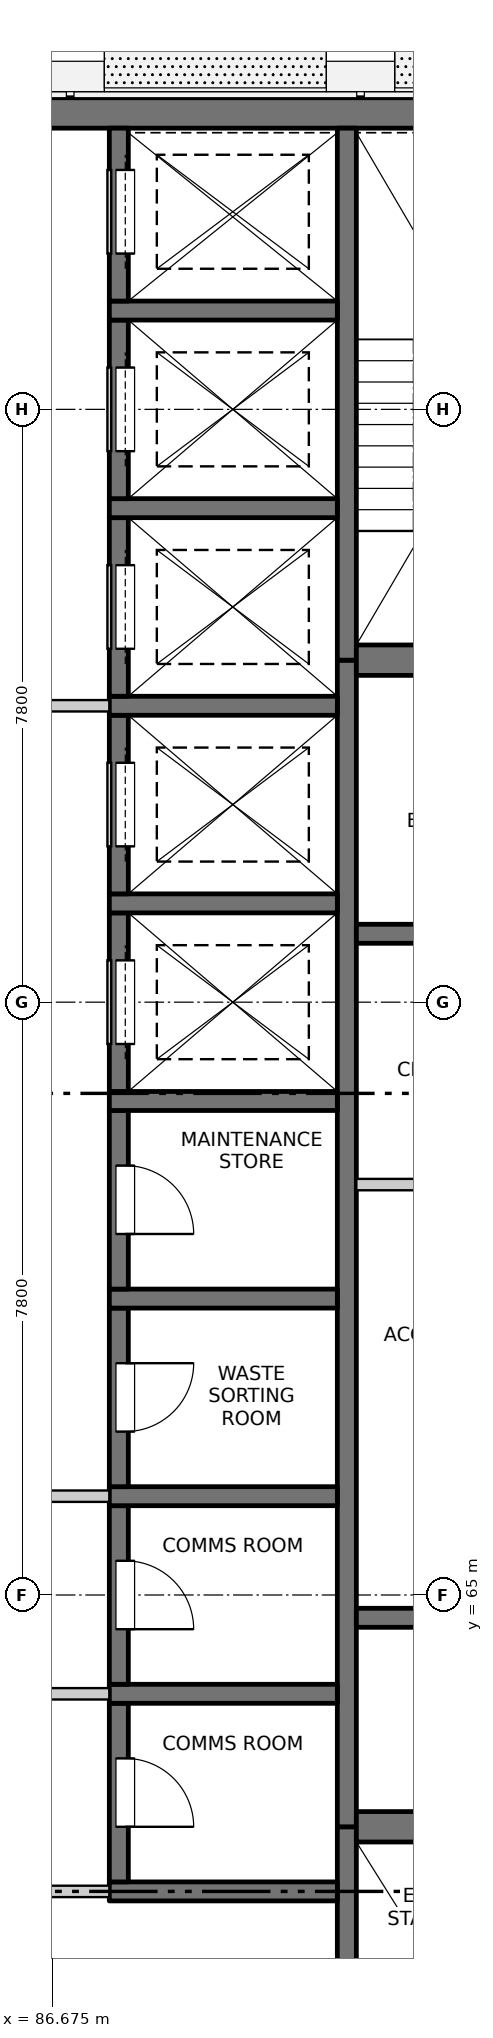
"""IFC4 building model, lengths in metres.
Left out: names, types, materials, properties, quantities, classifications, styles, units other than length and angle.
Written with IfcOpenShell. Run it as: python <this file> out.ifc"""

import sys

from ifc_helpers import new_model, si_unit, direction, frame, frame_2d, origin, place, context, subcontext, project, spatial, rectangle, extrude, element, fill, save


model = new_model("IFC4")
c1 = context("Model", 3, precision=1e-05, world=origin(), true_north=direction((0.0, 1.0)))
c2 = subcontext(c1, "Body", "Model", "MODEL_VIEW")
j1 = project(units=[si_unit("LENGTHUNIT", "METRE"), si_unit("PLANEANGLEUNIT", "RADIAN")], contexts=[c1])
p1 = place(None, origin())
s1 = spatial("IfcSite", under=j1, at=p1, CompositionType="ELEMENT")
p2 = place(p1, origin())
s2 = spatial("IfcBuilding", under=s1, at=p2, CompositionType="ELEMENT")
p3 = place(p2, frame((0.0, 0.0, 263.0)))
s3 = spatial("IfcBuildingStorey", under=s2, at=p3, CompositionType="ELEMENT", Elevation=263.0)
p4 = place(p3, frame((75.45, 84.5, -0.25), z_axis=(0.0, 0.0, 1.0), x_axis=(1.0, 0.0, 0.0)))
e1 = element("IfcWall", 1, at=p4, inside=s3, PredefinedType="SOLIDWALL", context=c2, shape_type="SweptSolid", body=[
    extrude(rectangle(XDim=19.1, YDim=0.4, at=frame_2d((9.55, 0.0))), origin(), (0.0, 0.0, 1.0), 3.35),
])
p5 = place(p3, frame((90.55, 55.45, -0.25), z_axis=(0.0, 0.0, 1.0), x_axis=(0.0, 1.0, 0.0)))
e2 = element("IfcWall", 2, at=p5, inside=s3, PredefinedType="SOLIDWALL", context=c2, shape_type="SweptSolid", body=[
    extrude(rectangle(XDim=6.5, YDim=0.25, at=frame_2d((3.25, 0.0))), origin(), (0.0, 0.0, 1.0), 3.35),
])
p6 = place(p5, frame((0.2, 0.0, 0.25)))
e3 = element("IfcOpeningElement", 3, at=p6, cuts=e2, PredefinedType="OPENING", context=c2, shape_type="SweptSolid", body=[
    extrude(rectangle(XDim=1.2, YDim=2.1, at=frame_2d((0.6, 1.05))), frame((0.0, 0.135, 0.0), z_axis=(0.0, -1.0, 0.0), x_axis=(1.0, 0.0, 0.0)), (0.0, 0.0, 1.0), 0.27),
])
p7 = place(p3, frame((90.55, 61.95, -0.25), z_axis=(0.0, 0.0, 1.0), x_axis=(0.0, 1.0, 0.0)))
e4 = element("IfcWall", 4, at=p7, inside=s3, PredefinedType="SOLIDWALL", context=c2, shape_type="SweptSolid", body=[
    extrude(rectangle(XDim=15.35, YDim=0.25, at=frame_2d((7.675, 0.0))), origin(), (0.0, 0.0, 1.0), 3.35),
])
p8 = place(p3, frame((90.55, 77.3, -0.25), z_axis=(0.0, 0.0, 1.0), x_axis=(0.0, 1.0, 0.0)))
e5 = element("IfcWall", 5, at=p8, inside=s3, PredefinedType="SOLIDWALL", context=c2, shape_type="SweptSolid", body=[
    extrude(rectangle(XDim=7.0, YDim=0.25, at=frame_2d((3.5, 0.0))), origin(), (0.0, 0.0, 1.0), 3.35),
])
p9 = place(p3, frame((87.425, 61.1, -0.25), z_axis=(0.0, 0.0, 1.0), x_axis=(1.0, 0.0, 0.0)))
e6 = element("IfcWall", 6, at=p9, inside=s3, PredefinedType="SOLIDWALL", context=c2, shape_type="SweptSolid", body=[
    extrude(rectangle(XDim=3.0, YDim=0.25, at=frame_2d((1.5, 0.0))), origin(), (0.0, 0.0, 1.0), 3.35),
])
p10 = place(p3, frame((87.55, 61.225, -0.25), z_axis=(0.0, 0.0, 1.0), x_axis=(0.0, 1.0, 0.0)))
e7 = element("IfcWall", 7, at=p10, inside=s3, PredefinedType="SOLIDWALL", context=c2, shape_type="SweptSolid", body=[
    extrude(rectangle(XDim=2.35, YDim=0.25, at=frame_2d((1.175, 0.0))), origin(), (0.0, 0.0, 1.0), 3.35),
])
p11 = place(p10, frame((0.725, 0.0, 0.25)))
e8 = element("IfcOpeningElement", 8, at=p11, cuts=e7, PredefinedType="OPENING", context=c2, shape_type="SweptSolid", body=[
    extrude(rectangle(XDim=0.9, YDim=2.1, at=frame_2d((0.45, 1.05))), frame((0.0, 0.135, 0.0), z_axis=(0.0, -1.0, 0.0), x_axis=(1.0, 0.0, 0.0)), (0.0, 0.0, 1.0), 0.27),
])
p12 = place(p3, frame((87.425, 63.7, -0.25), z_axis=(0.0, 0.0, 1.0), x_axis=(1.0, 0.0, 0.0)))
e9 = element("IfcWall", 9, at=p12, inside=s3, PredefinedType="SOLIDWALL", context=c2, shape_type="SweptSolid", body=[
    extrude(rectangle(XDim=3.0, YDim=0.25, at=frame_2d((1.5, 0.0))), origin(), (0.0, 0.0, 1.0), 3.35),
])
p13 = place(p3, frame((87.55, 63.825, -0.25), z_axis=(0.0, 0.0, 1.0), x_axis=(0.0, 1.0, 0.0)))
e10 = element("IfcWall", 10, at=p13, inside=s3, PredefinedType="SOLIDWALL", context=c2, shape_type="SweptSolid", body=[
    extrude(rectangle(XDim=2.35, YDim=0.25, at=frame_2d((1.175, 0.0))), origin(), (0.0, 0.0, 1.0), 3.35),
])
p14 = place(p13, frame((0.725, 0.0, 0.25)))
e11 = element("IfcOpeningElement", 11, at=p14, cuts=e10, PredefinedType="OPENING", context=c2, shape_type="SweptSolid", body=[
    extrude(rectangle(XDim=0.9, YDim=2.1, at=frame_2d((0.45, 1.05))), frame((0.0, 0.135, 0.0), z_axis=(0.0, -1.0, 0.0), x_axis=(1.0, 0.0, 0.0)), (0.0, 0.0, 1.0), 0.27),
])
p15 = place(p3, frame((87.425, 66.3, -0.25), z_axis=(0.0, 0.0, 1.0), x_axis=(1.0, 0.0, 0.0)))
e12 = element("IfcWall", 12, at=p15, inside=s3, PredefinedType="SOLIDWALL", context=c2, shape_type="SweptSolid", body=[
    extrude(rectangle(XDim=3.0, YDim=0.25, at=frame_2d((1.5, 0.0))), origin(), (0.0, 0.0, 1.0), 3.35),
])
p16 = place(p3, frame((87.55, 66.425, -0.25), z_axis=(0.0, 0.0, 1.0), x_axis=(0.0, 1.0, 0.0)))
e13 = element("IfcWall", 13, at=p16, inside=s3, PredefinedType="SOLIDWALL", context=c2, shape_type="SweptSolid", body=[
    extrude(rectangle(XDim=2.35, YDim=0.25, at=frame_2d((1.175, 0.0))), origin(), (0.0, 0.0, 1.0), 3.35),
])
p17 = place(p16, frame((0.725, 0.0, 0.25)))
e14 = element("IfcOpeningElement", 14, at=p17, cuts=e13, PredefinedType="OPENING", context=c2, shape_type="SweptSolid", body=[
    extrude(rectangle(XDim=0.9, YDim=2.1, at=frame_2d((0.45, 1.05))), frame((0.0, 0.135, 0.0), z_axis=(0.0, -1.0, 0.0), x_axis=(1.0, 0.0, 0.0)), (0.0, 0.0, 1.0), 0.27),
])
p18 = place(p3, frame((87.425, 68.9, -0.25), z_axis=(0.0, 0.0, 1.0), x_axis=(1.0, 0.0, 0.0)))
e15 = element("IfcWall", 15, at=p18, inside=s3, PredefinedType="SOLIDWALL", context=c2, shape_type="SweptSolid", body=[
    extrude(rectangle(XDim=3.0, YDim=0.25, at=frame_2d((1.5, 0.0))), origin(), (0.0, 0.0, 1.0), 3.35),
])
p19 = place(p3, frame((87.55, 69.025, -0.25), z_axis=(0.0, 0.0, 1.0), x_axis=(0.0, 1.0, 0.0)))
e16 = element("IfcWall", 16, at=p19, inside=s3, PredefinedType="SOLIDWALL", context=c2, shape_type="SweptSolid", body=[
    extrude(rectangle(XDim=2.35, YDim=0.25, at=frame_2d((1.175, 0.0))), origin(), (0.0, 0.0, 1.0), 3.35),
])
p20 = place(p19, frame((0.725, 0.0, 0.25)))
e17 = element("IfcOpeningElement", 17, at=p20, cuts=e16, PredefinedType="OPENING", context=c2, shape_type="SweptSolid", body=[
    extrude(rectangle(XDim=0.9, YDim=2.1, at=frame_2d((0.45, 1.05))), frame((0.0, 0.135, 0.0), z_axis=(0.0, -1.0, 0.0), x_axis=(1.0, 0.0, 0.0)), (0.0, 0.0, 1.0), 0.27),
])
p21 = place(p3, frame((87.425, 71.5, -0.25), z_axis=(0.0, 0.0, 1.0), x_axis=(1.0, 0.0, 0.0)))
e18 = element("IfcWall", 18, at=p21, inside=s3, PredefinedType="SOLIDWALL", context=c2, shape_type="SweptSolid", body=[
    extrude(rectangle(XDim=3.0, YDim=0.25, at=frame_2d((1.5, 0.0))), origin(), (0.0, 0.0, 1.0), 3.35),
])
p22 = place(p3, frame((87.55, 71.625, -0.25), z_axis=(0.0, 0.0, 1.0), x_axis=(0.0, 1.0, 0.0)))
e19 = element("IfcWall", 19, at=p22, inside=s3, PredefinedType="SOLIDWALL", context=c2, shape_type="SweptSolid", body=[
    extrude(rectangle(XDim=2.35, YDim=0.25, at=frame_2d((1.175, 0.0))), origin(), (0.0, 0.0, 1.0), 3.35),
])
p23 = place(p22, frame((0.625, 0.0, 0.25)))
e20 = element("IfcOpeningElement", 20, at=p23, cuts=e19, PredefinedType="OPENING", context=c2, shape_type="SweptSolid", body=[
    extrude(rectangle(XDim=1.1, YDim=2.1, at=frame_2d((0.55, 1.05))), frame((0.0, 0.135, 0.0), z_axis=(0.0, -1.0, 0.0), x_axis=(1.0, 0.0, 0.0)), (0.0, 0.0, 1.0), 0.27),
])
p24 = place(p3, frame((87.425, 74.1, -0.25), z_axis=(0.0, 0.0, 1.0), x_axis=(1.0, 0.0, 0.0)))
e21 = element("IfcWall", 21, at=p24, inside=s3, PredefinedType="SOLIDWALL", context=c2, shape_type="SweptSolid", body=[
    extrude(rectangle(XDim=3.0, YDim=0.25, at=frame_2d((1.5, 0.0))), origin(), (0.0, 0.0, 1.0), 3.35),
])
p25 = place(p3, frame((87.55, 74.225, -0.25), z_axis=(0.0, 0.0, 1.0), x_axis=(0.0, 1.0, 0.0)))
e22 = element("IfcWall", 22, at=p25, inside=s3, PredefinedType="SOLIDWALL", context=c2, shape_type="SweptSolid", body=[
    extrude(rectangle(XDim=2.35, YDim=0.25, at=frame_2d((1.175, 0.0))), origin(), (0.0, 0.0, 1.0), 3.35),
])
p26 = place(p25, frame((0.625, 0.0, 0.25)))
e23 = element("IfcOpeningElement", 23, at=p26, cuts=e22, PredefinedType="OPENING", context=c2, shape_type="SweptSolid", body=[
    extrude(rectangle(XDim=1.1, YDim=2.1, at=frame_2d((0.55, 1.05))), frame((0.0, 0.135, 0.0), z_axis=(0.0, -1.0, 0.0), x_axis=(1.0, 0.0, 0.0)), (0.0, 0.0, 1.0), 0.27),
])
p27 = place(p3, frame((87.425, 76.7, -0.25), z_axis=(0.0, 0.0, 1.0), x_axis=(1.0, 0.0, 0.0)))
e24 = element("IfcWall", 24, at=p27, inside=s3, PredefinedType="SOLIDWALL", context=c2, shape_type="SweptSolid", body=[
    extrude(rectangle(XDim=3.0, YDim=0.25, at=frame_2d((1.5, 0.0))), origin(), (0.0, 0.0, 1.0), 3.35),
])
p28 = place(p3, frame((87.55, 76.825, -0.25), z_axis=(0.0, 0.0, 1.0), x_axis=(0.0, 1.0, 0.0)))
e25 = element("IfcWall", 25, at=p28, inside=s3, PredefinedType="SOLIDWALL", context=c2, shape_type="SweptSolid", body=[
    extrude(rectangle(XDim=2.35, YDim=0.25, at=frame_2d((1.175, 0.0))), origin(), (0.0, 0.0, 1.0), 3.35),
])
p29 = place(p28, frame((0.625, 0.0, 0.25)))
e26 = element("IfcOpeningElement", 26, at=p29, cuts=e25, PredefinedType="OPENING", context=c2, shape_type="SweptSolid", body=[
    extrude(rectangle(XDim=1.1, YDim=2.1, at=frame_2d((0.55, 1.05))), frame((0.0, 0.135, 0.0), z_axis=(0.0, -1.0, 0.0), x_axis=(1.0, 0.0, 0.0)), (0.0, 0.0, 1.0), 0.27),
])
p30 = place(p3, frame((87.425, 79.3, -0.25), z_axis=(0.0, 0.0, 1.0), x_axis=(1.0, 0.0, 0.0)))
e27 = element("IfcWall", 27, at=p30, inside=s3, PredefinedType="SOLIDWALL", context=c2, shape_type="SweptSolid", body=[
    extrude(rectangle(XDim=3.0, YDim=0.25, at=frame_2d((1.5, 0.0))), origin(), (0.0, 0.0, 1.0), 3.35),
])
p31 = place(p3, frame((87.55, 79.425, -0.25), z_axis=(0.0, 0.0, 1.0), x_axis=(0.0, 1.0, 0.0)))
e28 = element("IfcWall", 28, at=p31, inside=s3, PredefinedType="SOLIDWALL", context=c2, shape_type="SweptSolid", body=[
    extrude(rectangle(XDim=2.35, YDim=0.25, at=frame_2d((1.175, 0.0))), origin(), (0.0, 0.0, 1.0), 3.35),
])
p32 = place(p31, frame((0.625, 0.0, 0.25)))
e29 = element("IfcOpeningElement", 29, at=p32, cuts=e28, PredefinedType="OPENING", context=c2, shape_type="SweptSolid", body=[
    extrude(rectangle(XDim=1.1, YDim=2.1, at=frame_2d((0.55, 1.05))), frame((0.0, 0.135, 0.0), z_axis=(0.0, -1.0, 0.0), x_axis=(1.0, 0.0, 0.0)), (0.0, 0.0, 1.0), 0.27),
])
p33 = place(p3, frame((87.425, 81.9, -0.25), z_axis=(0.0, 0.0, 1.0), x_axis=(1.0, 0.0, 0.0)))
e30 = element("IfcWall", 30, at=p33, inside=s3, PredefinedType="SOLIDWALL", context=c2, shape_type="SweptSolid", body=[
    extrude(rectangle(XDim=3.0, YDim=0.25, at=frame_2d((1.5, 0.0))), origin(), (0.0, 0.0, 1.0), 3.35),
])
p34 = place(p3, frame((87.55, 82.025, -0.25), z_axis=(0.0, 0.0, 1.0), x_axis=(0.0, 1.0, 0.0)))
e31 = element("IfcWall", 31, at=p34, inside=s3, PredefinedType="SOLIDWALL", context=c2, shape_type="SweptSolid", body=[
    extrude(rectangle(XDim=2.275, YDim=0.25, at=frame_2d((1.138, 0.0))), origin(), (0.0, 0.0, 1.0), 3.35),
])
p35 = place(p34, frame((0.625, 0.0, 0.25)))
e32 = element("IfcOpeningElement", 32, at=p35, cuts=e31, PredefinedType="OPENING", context=c2, shape_type="SweptSolid", body=[
    extrude(rectangle(XDim=1.1, YDim=2.1, at=frame_2d((0.55, 1.05))), frame((0.0, 0.135, 0.0), z_axis=(0.0, -1.0, 0.0), x_axis=(1.0, 0.0, 0.0)), (0.0, 0.0, 1.0), 0.27),
])
p36 = place(p3, frame((90.675, 61.95, -0.25), z_axis=(0.0, 0.0, 1.0), x_axis=(1.0, 0.0, 0.0)))
e33 = element("IfcWall", 33, at=p36, inside=s3, PredefinedType="SOLIDWALL", context=c2, shape_type="SweptSolid", body=[
    extrude(rectangle(XDim=3.875, YDim=0.4, at=frame_2d((1.938, 0.0))), origin(), (0.0, 0.0, 1.0), 3.35),
])
for number, where, z_axis, x_axis in (
    (34, (90.675, 64.7, -0.25), (0.0, 0.0, 1.0), (1.0, 0.0, 0.0)),
    (35, (90.675, 73.7, -0.25), (0.0, 0.0, 1.0), (1.0, 0.0, 0.0)),
):
    element("IfcWall", number, at=place(p3, frame(where, z_axis=z_axis, x_axis=x_axis)), inside=s3, PredefinedType="SOLIDWALL", context=c2, shape_type="SweptSolid", body=[
        extrude(rectangle(XDim=3.875, YDim=0.25, at=frame_2d((1.938, 0.0))), origin(), (0.0, 0.0, 1.0), 3.35),
    ])
p37 = place(p3, frame((90.675, 77.3, -0.25), z_axis=(0.0, 0.0, 1.0), x_axis=(1.0, 0.0, 0.0)))
e36 = element("IfcWall", 36, at=p37, inside=s3, PredefinedType="SOLIDWALL", context=c2, shape_type="SweptSolid", body=[
    extrude(rectangle(XDim=3.875, YDim=0.4, at=frame_2d((1.938, 0.0))), origin(), (0.0, 0.0, 1.0), 3.35),
])
p38 = place(p3, frame((82.575, 61.1, 0.0), z_axis=(0.0, 0.0, 1.0), x_axis=(1.0, 0.0, 0.0)))
e37 = element("IfcWall", 37, at=p38, inside=s3, PredefinedType="PARTITIONING", context=c2, shape_type="SweptSolid", body=[
    extrude(rectangle(XDim=4.85, YDim=0.15, at=frame_2d((2.425, 0.0))), origin(), (0.0, 0.0, 1.0), 3.1),
])
p39 = place(p38, frame((1.525, 0.0, 0.0)))
e38 = element("IfcOpeningElement", 38, at=p39, cuts=e37, PredefinedType="OPENING", context=c2, shape_type="SweptSolid", body=[
    extrude(rectangle(XDim=1.8, YDim=2.1, at=frame_2d((0.9, 1.05))), frame((0.0, 0.085, 0.0), z_axis=(0.0, -1.0, 0.0), x_axis=(1.0, 0.0, 0.0)), (0.0, 0.0, 1.0), 0.17),
])
p40 = place(p3, frame((82.575, 63.7, 0.0), z_axis=(0.0, 0.0, 1.0), x_axis=(1.0, 0.0, 0.0)))
e39 = element("IfcWall", 39, at=p40, inside=s3, PredefinedType="PARTITIONING", context=c2, shape_type="SweptSolid", body=[
    extrude(rectangle(XDim=4.85, YDim=0.15, at=frame_2d((2.425, 0.0))), origin(), (0.0, 0.0, 1.0), 3.1),
])
p41 = place(p40, frame((1.525, 0.0, 0.0)))
e40 = element("IfcOpeningElement", 40, at=p41, cuts=e39, PredefinedType="OPENING", context=c2, shape_type="SweptSolid", body=[
    extrude(rectangle(XDim=1.8, YDim=2.1, at=frame_2d((0.9, 1.05))), frame((0.0, 0.085, 0.0), z_axis=(0.0, -1.0, 0.0), x_axis=(1.0, 0.0, 0.0)), (0.0, 0.0, 1.0), 0.17),
])
p42 = place(p3, frame((82.575, 66.3, 0.0), z_axis=(0.0, 0.0, 1.0), x_axis=(1.0, 0.0, 0.0)))
e41 = element("IfcWall", 41, at=p42, inside=s3, PredefinedType="PARTITIONING", context=c2, shape_type="SweptSolid", body=[
    extrude(rectangle(XDim=4.85, YDim=0.15, at=frame_2d((2.425, 0.0))), origin(), (0.0, 0.0, 1.0), 3.1),
])
p43 = place(p42, frame((1.525, 0.0, 0.0)))
e42 = element("IfcOpeningElement", 42, at=p43, cuts=e41, PredefinedType="OPENING", context=c2, shape_type="SweptSolid", body=[
    extrude(rectangle(XDim=1.8, YDim=2.1, at=frame_2d((0.9, 1.05))), frame((0.0, 0.085, 0.0), z_axis=(0.0, -1.0, 0.0), x_axis=(1.0, 0.0, 0.0)), (0.0, 0.0, 1.0), 0.17),
])
p44 = place(p3, frame((90.675, 70.4, 0.0), z_axis=(0.0, 0.0, 1.0), x_axis=(1.0, 0.0, 0.0)))
e43 = element("IfcWall", 43, at=p44, inside=s3, PredefinedType="PARTITIONING", context=c2, shape_type="SweptSolid", body=[
    extrude(rectangle(XDim=3.875, YDim=0.15, at=frame_2d((1.938, 0.0))), origin(), (0.0, 0.0, 1.0), 3.1),
])
p45 = place(p3, frame((82.575, 76.7, 0.0), z_axis=(0.0, 0.0, 1.0), x_axis=(1.0, 0.0, 0.0)))
e44 = element("IfcWall", 44, at=p45, inside=s3, PredefinedType="PARTITIONING", context=c2, shape_type="SweptSolid", body=[
    extrude(rectangle(XDim=4.85, YDim=0.15, at=frame_2d((2.425, 0.0))), origin(), (0.0, 0.0, 1.0), 3.1),
])
p46 = place(p45, frame((1.525, 0.0, 0.0)))
e45 = element("IfcOpeningElement", 45, at=p46, cuts=e44, PredefinedType="OPENING", context=c2, shape_type="SweptSolid", body=[
    extrude(rectangle(XDim=1.8, YDim=2.1, at=frame_2d((0.9, 1.05))), frame((0.0, 0.085, 0.0), z_axis=(0.0, -1.0, 0.0), x_axis=(1.0, 0.0, 0.0)), (0.0, 0.0, 1.0), 0.17),
])
p47 = place(p11, origin())
e46 = element("IfcDoor", 46, at=p47, inside=s3, OperationType="SINGLE_SWING_RIGHT", PredefinedType="DOOR", context=c2, shape_type="SweptSolid", body=[
    extrude(rectangle(XDim=0.9, YDim=2.1, at=frame_2d((0.45, 1.05))), frame((0.0, -0.06, 0.0), z_axis=(0.0, -1.0, 0.0), x_axis=(1.0, 0.0, 0.0)), (0.0, 0.0, 1.0), 0.05),
])
fill(e8, e46)
p48 = place(p14, origin())
e47 = element("IfcDoor", 47, at=p48, inside=s3, OperationType="SINGLE_SWING_RIGHT", PredefinedType="DOOR", context=c2, shape_type="SweptSolid", body=[
    extrude(rectangle(XDim=0.9, YDim=2.1, at=frame_2d((0.45, 1.05))), frame((0.0, -0.06, 0.0), z_axis=(0.0, -1.0, 0.0), x_axis=(1.0, 0.0, 0.0)), (0.0, 0.0, 1.0), 0.05),
])
fill(e11, e47)
p49 = place(p17, origin())
e48 = element("IfcDoor", 48, at=p49, inside=s3, OperationType="SINGLE_SWING_LEFT", PredefinedType="DOOR", context=c2, shape_type="SweptSolid", body=[
    extrude(rectangle(XDim=0.9, YDim=2.1, at=frame_2d((0.45, 1.05))), frame((0.0, -0.06, 0.0), z_axis=(0.0, -1.0, 0.0), x_axis=(1.0, 0.0, 0.0)), (0.0, 0.0, 1.0), 0.05),
])
fill(e14, e48)
p50 = place(p20, origin())
e49 = element("IfcDoor", 49, at=p50, inside=s3, OperationType="SINGLE_SWING_RIGHT", PredefinedType="DOOR", context=c2, shape_type="SweptSolid", body=[
    extrude(rectangle(XDim=0.9, YDim=2.1, at=frame_2d((0.45, 1.05))), frame((0.0, -0.06, 0.0), z_axis=(0.0, -1.0, 0.0), x_axis=(1.0, 0.0, 0.0)), (0.0, 0.0, 1.0), 0.05),
])
fill(e17, e49)
p51 = place(p23, origin())
e50 = element("IfcDoor", 50, at=p51, inside=s3, OperationType="SLIDING_TO_LEFT", PredefinedType="DOOR", context=c2, shape_type="SweptSolid", body=[
    extrude(rectangle(XDim=1.1, YDim=2.1, at=frame_2d((0.55, 1.05))), frame((0.0, -0.06, 0.0), z_axis=(0.0, -1.0, 0.0), x_axis=(1.0, 0.0, 0.0)), (0.0, 0.0, 1.0), 0.05),
])
fill(e20, e50)
p52 = place(p26, origin())
e51 = element("IfcDoor", 51, at=p52, inside=s3, OperationType="SLIDING_TO_LEFT", PredefinedType="DOOR", context=c2, shape_type="SweptSolid", body=[
    extrude(rectangle(XDim=1.1, YDim=2.1, at=frame_2d((0.55, 1.05))), frame((0.0, -0.06, 0.0), z_axis=(0.0, -1.0, 0.0), x_axis=(1.0, 0.0, 0.0)), (0.0, 0.0, 1.0), 0.05),
])
fill(e23, e51)
p53 = place(p29, origin())
e52 = element("IfcDoor", 52, at=p53, inside=s3, OperationType="SLIDING_TO_LEFT", PredefinedType="DOOR", context=c2, shape_type="SweptSolid", body=[
    extrude(rectangle(XDim=1.1, YDim=2.1, at=frame_2d((0.55, 1.05))), frame((0.0, -0.06, 0.0), z_axis=(0.0, -1.0, 0.0), x_axis=(1.0, 0.0, 0.0)), (0.0, 0.0, 1.0), 0.05),
])
fill(e26, e52)
p54 = place(p32, origin())
e53 = element("IfcDoor", 53, at=p54, inside=s3, OperationType="SLIDING_TO_RIGHT", PredefinedType="DOOR", context=c2, shape_type="SweptSolid", body=[
    extrude(rectangle(XDim=1.1, YDim=2.1, at=frame_2d((0.55, 1.05))), frame((0.0, -0.06, 0.0), z_axis=(0.0, -1.0, 0.0), x_axis=(1.0, 0.0, 0.0)), (0.0, 0.0, 1.0), 0.05),
])
fill(e29, e53)
p55 = place(p35, origin())
e54 = element("IfcDoor", 54, at=p55, inside=s3, OperationType="SLIDING_TO_RIGHT", PredefinedType="DOOR", context=c2, shape_type="SweptSolid", body=[
    extrude(rectangle(XDim=1.1, YDim=2.1, at=frame_2d((0.55, 1.05))), frame((0.0, -0.06, 0.0), z_axis=(0.0, -1.0, 0.0), x_axis=(1.0, 0.0, 0.0)), (0.0, 0.0, 1.0), 0.05),
])
fill(e32, e54)
save(model, sys.argv[1])
